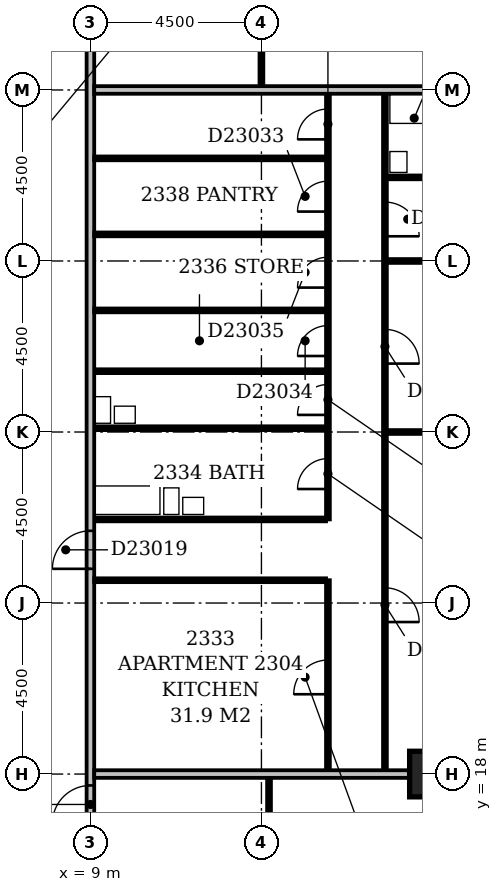
"""IFC4 building model, lengths in metres.
Left out: names, types, materials, properties, quantities, classifications, styles, units other than length and angle.
Written with IfcOpenShell. Run it as: python <this file> out.ifc"""

import sys

from ifc_helpers import new_model, si_unit, direction, frame, frame_2d, origin, origin_2d, place, context, subcontext, project, spatial, rectangle, extrude, element, fill, save


model = new_model("IFC4")
c1 = context("Model", 3, precision=1e-05, world=origin(), true_north=direction((0.0, 1.0)))
c2 = subcontext(c1, "Body", "Model", "MODEL_VIEW")
j1 = project(units=[si_unit("LENGTHUNIT", "METRE"), si_unit("PLANEANGLEUNIT", "RADIAN")], contexts=[c1])
p1 = place(None, origin())
s1 = spatial("IfcSite", under=j1, at=p1, CompositionType="ELEMENT")
p2 = place(p1, origin())
s2 = spatial("IfcBuilding", under=s1, at=p2, CompositionType="ELEMENT")
p3 = place(p2, frame((0.0, 0.0, 93.8)))
s3 = spatial("IfcBuildingStorey", under=s2, at=p3, CompositionType="ELEMENT", Elevation=93.8)
p4 = place(p3, frame((18.0, 18.0, -0.3), z_axis=(0.0, 0.0, 1.0), x_axis=(1.0, 0.0, 0.0)))
e1 = element("IfcColumn", 1, at=p4, inside=s3, PredefinedType="COLUMN", context=c2, shape_type="SweptSolid", body=[
    extrude(rectangle(XDim=1.2, YDim=1.2, at=origin_2d()), origin(), (0.0, 0.0, 1.0), 3.6),
])
p5 = place(p3, frame((9.0, 5.0, 0.0), z_axis=(0.0, 0.0, 1.0), x_axis=(0.0, 1.0, 0.0)))
e2 = element("IfcWall", 2, at=p5, inside=s3, PredefinedType="PARTITIONING", context=c2, shape_type="SweptSolid", body=[
    extrude(rectangle(XDim=44.5, YDim=0.2, at=frame_2d((22.25, 0.0))), origin(), (0.0, 0.0, 1.0), 3.3),
])
p6 = place(p5, frame((18.4, 0.0, 0.0)))
e3 = element("IfcOpeningElement", 3, at=p6, cuts=e2, PredefinedType="OPENING", context=c2, shape_type="SweptSolid", body=[
    extrude(rectangle(XDim=1.0, YDim=2.1, at=frame_2d((0.5, 1.05))), frame((0.0, 0.112, 0.0), z_axis=(0.0, -1.0, 0.0), x_axis=(1.0, 0.0, 0.0)), (0.0, 0.0, 1.0), 0.224),
])
p7 = place(p5, frame((11.7, 0.0, 0.0)))
e4 = element("IfcOpeningElement", 4, at=p7, cuts=e2, PredefinedType="OPENING", context=c2, shape_type="SweptSolid", body=[
    extrude(rectangle(XDim=1.0, YDim=2.1, at=frame_2d((0.5, 1.05))), frame((0.0, 0.112, 0.0), z_axis=(0.0, -1.0, 0.0), x_axis=(1.0, 0.0, 0.0)), (0.0, 0.0, 1.0), 0.224),
])
p8 = place(p5, frame((37.25, 0.0, 0.0)))
e5 = element("IfcOpeningElement", 5, at=p8, cuts=e2, PredefinedType="OPENING", context=c2, shape_type="SweptSolid", body=[
    extrude(rectangle(XDim=0.9, YDim=2.1, at=frame_2d((0.45, 1.05))), frame((0.0, 0.112, 0.0), z_axis=(0.0, -1.0, 0.0), x_axis=(1.0, 0.0, 0.0)), (0.0, 0.0, 1.0), 0.224),
])
p9 = place(p5, frame((1.5, 0.0, 0.0)))
e6 = element("IfcOpeningElement", 6, at=p9, cuts=e2, PredefinedType="OPENING", context=c2, shape_type="SweptSolid", body=[
    extrude(rectangle(XDim=0.9, YDim=2.1, at=frame_2d((0.45, 1.05))), frame((0.0, 0.112, 0.0), z_axis=(0.0, -1.0, 0.0), x_axis=(1.0, 0.0, 0.0)), (0.0, 0.0, 1.0), 0.224),
])
p10 = place(p3, frame((13.7, 9.6, 0.0), z_axis=(0.0, 0.0, 1.0), x_axis=(0.0, 1.0, 0.0)))
e7 = element("IfcWall", 7, at=p10, inside=s3, PredefinedType="PARTITIONING", context=c2, shape_type="SweptSolid", body=[
    extrude(rectangle(XDim=8.3, YDim=0.1, at=frame_2d((4.15, 0.0))), origin(), (0.0, 0.0, 1.0), 3.3),
])
p11 = place(p10, frame((1.2, 0.0, 0.0)))
e8 = element("IfcOpeningElement", 8, at=p11, cuts=e7, PredefinedType="OPENING", context=c2, shape_type="SweptSolid", body=[
    extrude(rectangle(XDim=0.9, YDim=2.1, at=frame_2d((0.45, 1.05))), frame((0.0, 0.062, 0.0), z_axis=(0.0, -1.0, 0.0), x_axis=(1.0, 0.0, 0.0)), (0.0, 0.0, 1.0), 0.124),
])
p12 = place(p10, frame((5.7, 0.0, 0.0)))
e9 = element("IfcOpeningElement", 9, at=p12, cuts=e7, PredefinedType="OPENING", context=c2, shape_type="SweptSolid", body=[
    extrude(rectangle(XDim=0.9, YDim=2.1, at=frame_2d((0.45, 1.05))), frame((0.0, 0.062, 0.0), z_axis=(0.0, -1.0, 0.0), x_axis=(1.0, 0.0, 0.0)), (0.0, 0.0, 1.0), 0.124),
])
p13 = place(p3, frame((9.1, 18.0, 0.0), z_axis=(0.0, 0.0, 1.0), x_axis=(1.0, 0.0, 0.0)))
e10 = element("IfcWall", 10, at=p13, inside=s3, PredefinedType="PARTITIONING", context=c2, shape_type="SweptSolid", body=[
    extrude(rectangle(XDim=8.3, YDim=0.2, at=frame_2d((4.15, 0.0))), origin(), (0.0, 0.0, 1.0), 2.6),
])
p14 = place(p3, frame((15.25, 18.1, 0.0), z_axis=(0.0, 0.0, 1.0), x_axis=(0.0, 1.0, 0.0)))
e11 = element("IfcWall", 11, at=p14, inside=s3, PredefinedType="PARTITIONING", context=c2, shape_type="SweptSolid", body=[
    extrude(rectangle(XDim=5.0, YDim=0.1, at=frame_2d((2.5, 0.0))), origin(), (0.0, 0.0, 1.0), 3.3),
])
p15 = place(p14, frame((2.0, 0.0, 0.0)))
e12 = element("IfcOpeningElement", 12, at=p15, cuts=e11, PredefinedType="OPENING", context=c2, shape_type="SweptSolid", body=[
    extrude(rectangle(XDim=0.9, YDim=2.1, at=frame_2d((0.45, 1.05))), frame((0.0, 0.062, 0.0), z_axis=(0.0, -1.0, 0.0), x_axis=(1.0, 0.0, 0.0)), (0.0, 0.0, 1.0), 0.124),
])
p16 = place(p3, frame((16.75, 18.1, 0.0), z_axis=(0.0, 0.0, 1.0), x_axis=(0.0, 1.0, 0.0)))
e13 = element("IfcWall", 13, at=p16, inside=s3, PredefinedType="PARTITIONING", context=c2, shape_type="SweptSolid", body=[
    extrude(rectangle(XDim=17.8, YDim=0.1, at=frame_2d((8.9, 0.0))), origin(), (0.0, 0.0, 1.0), 3.3),
])
p17 = place(p16, frame((3.9, 0.0, 0.0)))
e14 = element("IfcOpeningElement", 14, at=p17, cuts=e13, PredefinedType="OPENING", context=c2, shape_type="SweptSolid", body=[
    extrude(rectangle(XDim=0.9, YDim=2.1, at=frame_2d((0.45, 1.05))), frame((0.0, 0.062, 0.0), z_axis=(0.0, -1.0, 0.0), x_axis=(1.0, 0.0, 0.0)), (0.0, 0.0, 1.0), 0.124),
])
p18 = place(p16, frame((10.7, 0.0, 0.0)))
e15 = element("IfcOpeningElement", 15, at=p18, cuts=e13, PredefinedType="OPENING", context=c2, shape_type="SweptSolid", body=[
    extrude(rectangle(XDim=0.9, YDim=2.1, at=frame_2d((0.45, 1.05))), frame((0.0, 0.062, 0.0), z_axis=(0.0, -1.0, 0.0), x_axis=(1.0, 0.0, 0.0)), (0.0, 0.0, 1.0), 0.124),
])
p19 = place(p16, frame((14.05, 0.0, 0.0)))
e16 = element("IfcOpeningElement", 16, at=p19, cuts=e13, PredefinedType="OPENING", context=c2, shape_type="SweptSolid", body=[
    extrude(rectangle(XDim=0.9, YDim=2.1, at=frame_2d((0.45, 1.05))), frame((0.0, 0.062, 0.0), z_axis=(0.0, -1.0, 0.0), x_axis=(1.0, 0.0, 0.0)), (0.0, 0.0, 1.0), 0.124),
])
p20 = place(p3, frame((9.1, 23.1, 0.0), z_axis=(0.0, 0.0, 1.0), x_axis=(1.0, 0.0, 0.0)))
e17 = element("IfcWall", 17, at=p20, inside=s3, PredefinedType="PARTITIONING", context=c2, shape_type="SweptSolid", body=[
    extrude(rectangle(XDim=6.1, YDim=0.1, at=frame_2d((3.05, 0.0))), origin(), (0.0, 0.0, 1.0), 3.3),
])
p21 = place(p3, frame((9.1, 24.7, 0.0), z_axis=(0.0, 0.0, 1.0), x_axis=(1.0, 0.0, 0.0)))
e18 = element("IfcWall", 18, at=p21, inside=s3, PredefinedType="PLUMBINGWALL", context=c2, shape_type="SweptSolid", body=[
    extrude(rectangle(XDim=6.1, YDim=0.1, at=frame_2d((3.05, 0.0))), origin(), (0.0, 0.0, 1.0), 3.3),
])
p22 = place(p3, frame((15.25, 24.7, 0.0), z_axis=(0.0, 0.0, 1.0), x_axis=(0.0, 1.0, 0.0)))
e19 = element("IfcWall", 19, at=p22, inside=s3, PredefinedType="PARTITIONING", context=c2, shape_type="SweptSolid", body=[
    extrude(rectangle(XDim=11.2, YDim=0.1, at=frame_2d((5.6, 0.0))), origin(), (0.0, 0.0, 1.0), 3.3),
])
p23 = place(p22, frame((0.8, 0.0, 0.0)))
e20 = element("IfcOpeningElement", 20, at=p23, cuts=e19, PredefinedType="OPENING", context=c2, shape_type="SweptSolid", body=[
    extrude(rectangle(XDim=0.8, YDim=2.1, at=frame_2d((0.4, 1.05))), frame((0.0, 0.062, 0.0), z_axis=(0.0, -1.0, 0.0), x_axis=(1.0, 0.0, 0.0)), (0.0, 0.0, 1.0), 0.124),
])
p24 = place(p22, frame((8.1, 0.0, 0.0)))
e21 = element("IfcOpeningElement", 21, at=p24, cuts=e19, PredefinedType="OPENING", context=c2, shape_type="SweptSolid", body=[
    extrude(rectangle(XDim=0.8, YDim=2.1, at=frame_2d((0.4, 1.05))), frame((0.0, 0.062, 0.0), z_axis=(0.0, -1.0, 0.0), x_axis=(1.0, 0.0, 0.0)), (0.0, 0.0, 1.0), 0.124),
])
p25 = place(p22, frame((4.3, 0.0, 0.0)))
e22 = element("IfcOpeningElement", 22, at=p25, cuts=e19, PredefinedType="OPENING", context=c2, shape_type="SweptSolid", body=[
    extrude(rectangle(XDim=0.8, YDim=2.1, at=frame_2d((0.4, 1.05))), frame((0.0, 0.062, 0.0), z_axis=(0.0, -1.0, 0.0), x_axis=(1.0, 0.0, 0.0)), (0.0, 0.0, 1.0), 0.124),
])
p26 = place(p22, frame((6.1, 0.0, 0.0)))
e23 = element("IfcOpeningElement", 23, at=p26, cuts=e19, PredefinedType="OPENING", context=c2, shape_type="SweptSolid", body=[
    extrude(rectangle(XDim=0.8, YDim=2.1, at=frame_2d((0.4, 1.05))), frame((0.0, 0.062, 0.0), z_axis=(0.0, -1.0, 0.0), x_axis=(1.0, 0.0, 0.0)), (0.0, 0.0, 1.0), 0.124),
])
p27 = place(p22, frame((10.0, 0.0, 0.0)))
e24 = element("IfcOpeningElement", 24, at=p27, cuts=e19, PredefinedType="OPENING", context=c2, shape_type="SweptSolid", body=[
    extrude(rectangle(XDim=0.8, YDim=2.1, at=frame_2d((0.4, 1.05))), frame((0.0, 0.062, 0.0), z_axis=(0.0, -1.0, 0.0), x_axis=(1.0, 0.0, 0.0)), (0.0, 0.0, 1.0), 0.124),
])
p28 = place(p22, frame((2.75, 0.0, 0.0)))
e25 = element("IfcOpeningElement", 25, at=p28, cuts=e19, PredefinedType="OPENING", context=c2, shape_type="SweptSolid", body=[
    extrude(rectangle(XDim=0.8, YDim=2.1, at=frame_2d((0.4, 1.05))), frame((0.0, 0.062, 0.0), z_axis=(0.0, -1.0, 0.0), x_axis=(1.0, 0.0, 0.0)), (0.0, 0.0, 1.0), 0.124),
])
p29 = place(p3, frame((16.8, 27.0, 0.0), z_axis=(0.0, 0.0, 1.0), x_axis=(1.0, 0.0, 0.0)))
e26 = element("IfcWall", 26, at=p29, inside=s3, PredefinedType="PARTITIONING", context=c2, shape_type="SweptSolid", body=[
    extrude(rectangle(XDim=5.1, YDim=0.1, at=frame_2d((2.55, 0.0))), origin(), (0.0, 0.0, 1.0), 2.7),
])
p30 = place(p3, frame((9.1, 27.1, 0.0), z_axis=(0.0, 0.0, 1.0), x_axis=(1.0, 0.0, 0.0)))
e27 = element("IfcWall", 27, at=p30, inside=s3, PredefinedType="PLUMBINGWALL", context=c2, shape_type="SweptSolid", body=[
    extrude(rectangle(XDim=6.1, YDim=0.1, at=frame_2d((3.05, 0.0))), origin(), (0.0, 0.0, 1.0), 2.7),
])
p31 = place(p3, frame((9.1, 28.6, 0.0), z_axis=(0.0, 0.0, 1.0), x_axis=(1.0, 0.0, 0.0)))
e28 = element("IfcWall", 28, at=p31, inside=s3, PredefinedType="PLUMBINGWALL", context=c2, shape_type="SweptSolid", body=[
    extrude(rectangle(XDim=6.1, YDim=0.1, at=frame_2d((3.05, 0.0))), origin(), (0.0, 0.0, 1.0), 3.3),
])
p32 = place(p3, frame((9.1, 30.2, 0.0), z_axis=(0.0, 0.0, 1.0), x_axis=(1.0, 0.0, 0.0)))
e29 = element("IfcWall", 29, at=p32, inside=s3, PredefinedType="PARTITIONING", context=c2, shape_type="SweptSolid", body=[
    extrude(rectangle(XDim=6.1, YDim=0.1, at=frame_2d((3.05, 0.0))), origin(), (0.0, 0.0, 1.0), 3.3),
])
p33 = place(p3, frame((16.8, 31.5, 0.0), z_axis=(0.0, 0.0, 1.0), x_axis=(1.0, 0.0, 0.0)))
e30 = element("IfcWall", 30, at=p33, inside=s3, PredefinedType="PARTITIONING", context=c2, shape_type="SweptSolid", body=[
    extrude(rectangle(XDim=5.1, YDim=0.1, at=frame_2d((2.55, 0.0))), origin(), (0.0, 0.0, 1.0), 3.3),
])
p34 = place(p3, frame((9.1, 32.2, 0.0), z_axis=(0.0, 0.0, 1.0), x_axis=(1.0, 0.0, 0.0)))
e31 = element("IfcWall", 31, at=p34, inside=s3, PredefinedType="PARTITIONING", context=c2, shape_type="SweptSolid", body=[
    extrude(rectangle(XDim=6.1, YDim=0.1, at=frame_2d((3.05, 0.0))), origin(), (0.0, 0.0, 1.0), 3.3),
])
p35 = place(p3, frame((16.8, 33.7, 0.0), z_axis=(0.0, 0.0, 1.0), x_axis=(1.0, 0.0, 0.0)))
e32 = element("IfcWall", 32, at=p35, inside=s3, PredefinedType="PLUMBINGWALL", context=c2, shape_type="SweptSolid", body=[
    extrude(rectangle(XDim=2.8, YDim=0.1, at=frame_2d((1.4, 0.0))), origin(), (0.0, 0.0, 1.0), 3.3),
])
p36 = place(p35, frame((1.0, 0.0, 0.0)))
e33 = element("IfcOpeningElement", 33, at=p36, cuts=e32, PredefinedType="OPENING", context=c2, shape_type="SweptSolid", body=[
    extrude(rectangle(XDim=0.8, YDim=2.1, at=frame_2d((0.4, 1.05))), frame((0.0, 0.062, 0.0), z_axis=(0.0, -1.0, 0.0), x_axis=(1.0, 0.0, 0.0)), (0.0, 0.0, 1.0), 0.124),
])
p37 = place(p3, frame((9.1, 34.2, 0.0), z_axis=(0.0, 0.0, 1.0), x_axis=(1.0, 0.0, 0.0)))
e34 = element("IfcWall", 34, at=p37, inside=s3, PredefinedType="PARTITIONING", context=c2, shape_type="SweptSolid", body=[
    extrude(rectangle(XDim=6.1, YDim=0.1, at=frame_2d((3.05, 0.0))), origin(), (0.0, 0.0, 1.0), 3.3),
])
p38 = place(p3, frame((9.1, 36.0, 0.0), z_axis=(0.0, 0.0, 1.0), x_axis=(1.0, 0.0, 0.0)))
e35 = element("IfcWall", 35, at=p38, inside=s3, PredefinedType="PARTITIONING", context=c2, shape_type="SweptSolid", body=[
    extrude(rectangle(XDim=12.8, YDim=0.2, at=frame_2d((6.4, 0.0))), origin(), (0.0, 0.0, 1.0), 2.4),
])
p39 = place(p3, frame((13.5, 36.1, 0.0), z_axis=(0.0, 0.0, 1.0), x_axis=(0.0, 1.0, 0.0)))
e36 = element("IfcWall", 36, at=p39, inside=s3, PredefinedType="PARTITIONING", context=c2, shape_type="SweptSolid", body=[
    extrude(rectangle(XDim=13.3, YDim=0.1, at=frame_2d((6.65, 0.0))), origin(), (0.0, 0.0, 1.0), 3.3),
])
p40 = place(p6, origin())
e37 = element("IfcDoor", 37, at=p40, inside=s3, OperationType="SINGLE_SWING_LEFT", PredefinedType="DOOR", context=c2, shape_type="SweptSolid", body=[
    extrude(rectangle(XDim=1.0, YDim=2.1, at=frame_2d((0.5, 1.05))), frame((0.0, 0.025, 0.0), z_axis=(0.0, -1.0, 0.0), x_axis=(1.0, 0.0, 0.0)), (0.0, 0.0, 1.0), 0.05),
])
fill(e3, e37)
p41 = place(p7, origin())
e38 = element("IfcDoor", 38, at=p41, inside=s3, OperationType="SINGLE_SWING_LEFT", PredefinedType="DOOR", context=c2, shape_type="SweptSolid", body=[
    extrude(rectangle(XDim=1.0, YDim=2.1, at=frame_2d((0.5, 1.05))), frame((0.0, 0.025, 0.0), z_axis=(0.0, -1.0, 0.0), x_axis=(1.0, 0.0, 0.0)), (0.0, 0.0, 1.0), 0.05),
])
fill(e4, e38)
p42 = place(p15, origin())
e39 = element("IfcDoor", 39, at=p42, inside=s3, OperationType="SINGLE_SWING_LEFT", PredefinedType="DOOR", context=c2, shape_type="SweptSolid", body=[
    extrude(rectangle(XDim=0.9, YDim=2.1, at=frame_2d((0.45, 1.05))), frame((0.0, 0.025, 0.0), z_axis=(0.0, -1.0, 0.0), x_axis=(1.0, 0.0, 0.0)), (0.0, 0.0, 1.0), 0.05),
])
fill(e12, e39)
p43 = place(p17, frame((0.9, 0.0, 0.0), z_axis=(0.0, 0.0, 1.0), x_axis=(-1.0, 0.0, 0.0)))
e40 = element("IfcDoor", 40, at=p43, inside=s3, OperationType="SINGLE_SWING_RIGHT", PredefinedType="DOOR", context=c2, shape_type="SweptSolid", body=[
    extrude(rectangle(XDim=0.9, YDim=2.1, at=frame_2d((0.45, 1.05))), frame((0.0, 0.025, 0.0), z_axis=(0.0, -1.0, 0.0), x_axis=(1.0, 0.0, 0.0)), (0.0, 0.0, 1.0), 0.05),
])
fill(e14, e40)
p44 = place(p18, frame((0.9, 0.0, 0.0), z_axis=(0.0, 0.0, 1.0), x_axis=(-1.0, 0.0, 0.0)))
e41 = element("IfcDoor", 41, at=p44, inside=s3, OperationType="SINGLE_SWING_RIGHT", PredefinedType="DOOR", context=c2, shape_type="SweptSolid", body=[
    extrude(rectangle(XDim=0.9, YDim=2.1, at=frame_2d((0.45, 1.05))), frame((0.0, 0.025, 0.0), z_axis=(0.0, -1.0, 0.0), x_axis=(1.0, 0.0, 0.0)), (0.0, 0.0, 1.0), 0.05),
])
fill(e15, e41)
p45 = place(p19, frame((0.9, 0.0, 0.0), z_axis=(0.0, 0.0, 1.0), x_axis=(-1.0, 0.0, 0.0)))
e42 = element("IfcDoor", 42, at=p45, inside=s3, OperationType="SINGLE_SWING_RIGHT", PredefinedType="DOOR", context=c2, shape_type="SweptSolid", body=[
    extrude(rectangle(XDim=0.9, YDim=2.1, at=frame_2d((0.45, 1.05))), frame((0.0, 0.025, 0.0), z_axis=(0.0, -1.0, 0.0), x_axis=(1.0, 0.0, 0.0)), (0.0, 0.0, 1.0), 0.05),
])
fill(e16, e42)
p46 = place(p23, origin())
e43 = element("IfcDoor", 43, at=p46, inside=s3, OperationType="SINGLE_SWING_LEFT", PredefinedType="DOOR", context=c2, shape_type="SweptSolid", body=[
    extrude(rectangle(XDim=0.8, YDim=2.1, at=frame_2d((0.4, 1.05))), frame((0.0, 0.025, 0.0), z_axis=(0.0, -1.0, 0.0), x_axis=(1.0, 0.0, 0.0)), (0.0, 0.0, 1.0), 0.05),
])
fill(e20, e43)
p47 = place(p24, origin())
e44 = element("IfcDoor", 44, at=p47, inside=s3, OperationType="SINGLE_SWING_LEFT", PredefinedType="DOOR", context=c2, shape_type="SweptSolid", body=[
    extrude(rectangle(XDim=0.8, YDim=2.1, at=frame_2d((0.4, 1.05))), frame((0.0, 0.025, 0.0), z_axis=(0.0, -1.0, 0.0), x_axis=(1.0, 0.0, 0.0)), (0.0, 0.0, 1.0), 0.05),
])
fill(e21, e44)
p48 = place(p25, origin())
e45 = element("IfcDoor", 45, at=p48, inside=s3, OperationType="SINGLE_SWING_LEFT", PredefinedType="DOOR", context=c2, shape_type="SweptSolid", body=[
    extrude(rectangle(XDim=0.8, YDim=2.1, at=frame_2d((0.4, 1.05))), frame((0.0, 0.025, 0.0), z_axis=(0.0, -1.0, 0.0), x_axis=(1.0, 0.0, 0.0)), (0.0, 0.0, 1.0), 0.05),
])
fill(e22, e45)
p49 = place(p26, origin())
e46 = element("IfcDoor", 46, at=p49, inside=s3, OperationType="SINGLE_SWING_LEFT", PredefinedType="DOOR", context=c2, shape_type="SweptSolid", body=[
    extrude(rectangle(XDim=0.8, YDim=2.1, at=frame_2d((0.4, 1.05))), frame((0.0, 0.025, 0.0), z_axis=(0.0, -1.0, 0.0), x_axis=(1.0, 0.0, 0.0)), (0.0, 0.0, 1.0), 0.05),
])
fill(e23, e46)
p50 = place(p27, origin())
e47 = element("IfcDoor", 47, at=p50, inside=s3, OperationType="SINGLE_SWING_LEFT", PredefinedType="DOOR", context=c2, shape_type="SweptSolid", body=[
    extrude(rectangle(XDim=0.8, YDim=2.1, at=frame_2d((0.4, 1.05))), frame((0.0, 0.025, 0.0), z_axis=(0.0, -1.0, 0.0), x_axis=(1.0, 0.0, 0.0)), (0.0, 0.0, 1.0), 0.05),
])
fill(e24, e47)
p51 = place(p28, origin())
e48 = element("IfcDoor", 48, at=p51, inside=s3, OperationType="SINGLE_SWING_LEFT", PredefinedType="DOOR", context=c2, shape_type="SweptSolid", body=[
    extrude(rectangle(XDim=0.8, YDim=2.1, at=frame_2d((0.4, 1.05))), frame((0.0, 0.025, 0.0), z_axis=(0.0, -1.0, 0.0), x_axis=(1.0, 0.0, 0.0)), (0.0, 0.0, 1.0), 0.05),
])
fill(e25, e48)
save(model, sys.argv[1])
